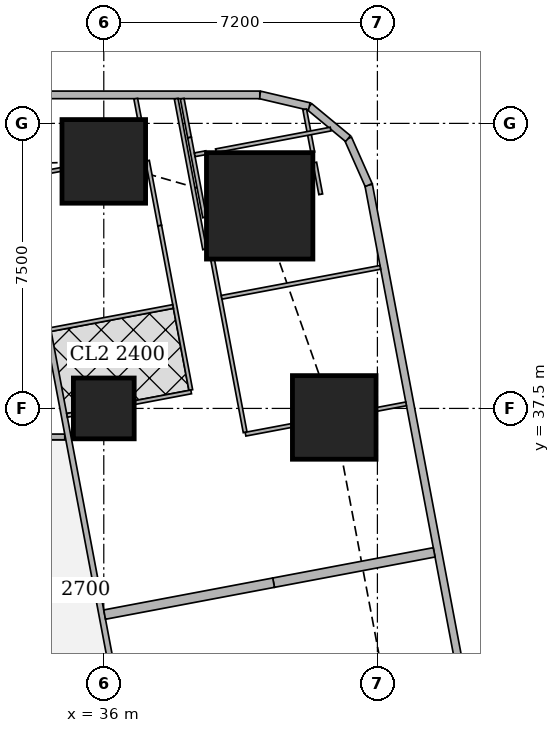
"""IFC4 building model, lengths in metres.
Left out: names, types, materials, properties, quantities, classifications, styles, units other than length and angle.
Written with IfcOpenShell. Run it as: python <this file> out.ifc"""

import sys

from ifc_helpers import new_model, si_unit, direction, frame, frame_2d, origin, origin_2d, place, context, subcontext, project, spatial, rectangle, extrude, element, fill, save


model = new_model("IFC4")
c1 = context("Model", 3, precision=1e-05, world=origin(), true_north=direction((0.0, 1.0)))
c2 = subcontext(c1, "Body", "Model", "MODEL_VIEW")
j1 = project(units=[si_unit("LENGTHUNIT", "METRE"), si_unit("PLANEANGLEUNIT", "RADIAN")], contexts=[c1])
p1 = place(None, origin())
s1 = spatial("IfcSite", under=j1, at=p1, CompositionType="ELEMENT")
p2 = place(p1, origin())
s2 = spatial("IfcBuilding", under=s1, at=p2, CompositionType="ELEMENT")
p3 = place(p2, frame((0.0, 0.0, 100.4)))
s3 = spatial("IfcBuildingStorey", under=s2, at=p3, CompositionType="ELEMENT", Elevation=100.4)
p4 = place(p3, frame((36.0, 37.5, 0.0), z_axis=(0.0, 0.0, 1.0), x_axis=(1.0, 0.0, 0.0)))
e1 = element("IfcColumn", 1, at=p4, inside=s3, PredefinedType="COLUMN", context=c2, shape_type="SweptSolid", body=[
    extrude(rectangle(XDim=1.6, YDim=1.6, at=origin_2d()), origin(), (0.0, 0.0, 1.0), 3.75),
])
p5 = place(p3, frame((42.064, 37.263, 0.0), z_axis=(0.0, 0.0, 1.0), x_axis=(1.0, 0.0, 0.0)))
e2 = element("IfcColumn", 2, at=p5, inside=s3, PredefinedType="COLUMN", context=c2, shape_type="SweptSolid", body=[
    extrude(rectangle(XDim=2.2, YDim=2.2, at=origin_2d()), origin(), (0.0, 0.0, 1.0), 3.75),
])
p6 = place(p3, frame((40.102, 42.83, 0.0), z_axis=(0.0, 0.0, 1.0), x_axis=(1.0, 0.0, 0.0)))
e3 = element("IfcColumn", 3, at=p6, inside=s3, PredefinedType="COLUMN", context=c2, shape_type="SweptSolid", body=[
    extrude(rectangle(XDim=2.8, YDim=2.8, at=origin_2d()), origin(), (0.0, 0.0, 1.0), 3.75),
])
p7 = place(p3, frame((36.0, 44.0, 0.0), z_axis=(0.0, 0.0, 1.0), x_axis=(1.0, 0.0, 0.0)))
e4 = element("IfcColumn", 4, at=p7, inside=s3, PredefinedType="COLUMN", context=c2, shape_type="SweptSolid", body=[
    extrude(rectangle(XDim=2.2, YDim=2.2, at=origin_2d()), origin(), (0.0, 0.0, 1.0), 3.75),
])
p8 = place(p3, frame((50.653, 2.703, 0.0), z_axis=(0.0, 0.0, 1.0), x_axis=(-0.185612026696, 0.982623109613, 0.0)))
e5 = element("IfcWall", 5, at=p8, inside=s3, PredefinedType="SOLIDWALL", context=c2, shape_type="SweptSolid", body=[
    extrude(rectangle(XDim=41.393, YDim=0.2, at=frame_2d((20.697, 0.0))), origin(), (0.0, 0.0, 1.0), 3.5),
])
p9 = place(p8, frame((1.633, 0.0, 0.9)))
e6 = element("IfcOpeningElement", 6, at=p9, cuts=e5, PredefinedType="OPENING", context=c2, shape_type="SweptSolid", body=[
    extrude(rectangle(XDim=1.8, YDim=1.5, at=frame_2d((0.9, 0.75))), frame((0.0, 0.11, 0.0), z_axis=(0.0, -1.0, 0.0), x_axis=(1.0, 0.0, 0.0)), (0.0, 0.0, 1.0), 0.22),
])
p10 = place(p8, frame((6.032, 0.0, 0.9)))
e7 = element("IfcOpeningElement", 7, at=p10, cuts=e5, PredefinedType="OPENING", context=c2, shape_type="SweptSolid", body=[
    extrude(rectangle(XDim=1.8, YDim=1.5, at=frame_2d((0.9, 0.75))), frame((0.0, 0.11, 0.0), z_axis=(0.0, -1.0, 0.0), x_axis=(1.0, 0.0, 0.0)), (0.0, 0.0, 1.0), 0.22),
])
p11 = place(p8, frame((9.848, 0.0, 0.9)))
e8 = element("IfcOpeningElement", 8, at=p11, cuts=e5, PredefinedType="OPENING", context=c2, shape_type="SweptSolid", body=[
    extrude(rectangle(XDim=1.8, YDim=1.5, at=frame_2d((0.9, 0.75))), frame((0.0, 0.11, 0.0), z_axis=(0.0, -1.0, 0.0), x_axis=(1.0, 0.0, 0.0)), (0.0, 0.0, 1.0), 0.22),
])
p12 = place(p8, frame((13.664, 0.0, 0.9)))
e9 = element("IfcOpeningElement", 9, at=p12, cuts=e5, PredefinedType="OPENING", context=c2, shape_type="SweptSolid", body=[
    extrude(rectangle(XDim=1.8, YDim=1.5, at=frame_2d((0.9, 0.75))), frame((0.0, 0.11, 0.0), z_axis=(0.0, -1.0, 0.0), x_axis=(1.0, 0.0, 0.0)), (0.0, 0.0, 1.0), 0.22),
])
p13 = place(p8, frame((17.481, 0.0, 0.9)))
e10 = element("IfcOpeningElement", 10, at=p13, cuts=e5, PredefinedType="OPENING", context=c2, shape_type="SweptSolid", body=[
    extrude(rectangle(XDim=1.8, YDim=1.5, at=frame_2d((0.9, 0.75))), frame((0.0, 0.11, 0.0), z_axis=(0.0, -1.0, 0.0), x_axis=(1.0, 0.0, 0.0)), (0.0, 0.0, 1.0), 0.22),
])
p14 = place(p8, frame((21.297, 0.0, 0.9)))
e11 = element("IfcOpeningElement", 11, at=p14, cuts=e5, PredefinedType="OPENING", context=c2, shape_type="SweptSolid", body=[
    extrude(rectangle(XDim=1.8, YDim=1.5, at=frame_2d((0.9, 0.75))), frame((0.0, 0.11, 0.0), z_axis=(0.0, -1.0, 0.0), x_axis=(1.0, 0.0, 0.0)), (0.0, 0.0, 1.0), 0.22),
])
p15 = place(p8, frame((25.113, 0.0, 0.9)))
e12 = element("IfcOpeningElement", 12, at=p15, cuts=e5, PredefinedType="OPENING", context=c2, shape_type="SweptSolid", body=[
    extrude(rectangle(XDim=1.8, YDim=1.5, at=frame_2d((0.9, 0.75))), frame((0.0, 0.11, 0.0), z_axis=(0.0, -1.0, 0.0), x_axis=(1.0, 0.0, 0.0)), (0.0, 0.0, 1.0), 0.22),
])
p16 = place(p8, frame((28.93, 0.0, 0.9)))
e13 = element("IfcOpeningElement", 13, at=p16, cuts=e5, PredefinedType="OPENING", context=c2, shape_type="SweptSolid", body=[
    extrude(rectangle(XDim=1.8, YDim=1.5, at=frame_2d((0.9, 0.75))), frame((0.0, 0.11, 0.0), z_axis=(0.0, -1.0, 0.0), x_axis=(1.0, 0.0, 0.0)), (0.0, 0.0, 1.0), 0.22),
])
p17 = place(p8, frame((32.746, 0.0, 0.9)))
e14 = element("IfcOpeningElement", 14, at=p17, cuts=e5, PredefinedType="OPENING", context=c2, shape_type="SweptSolid", body=[
    extrude(rectangle(XDim=1.8, YDim=1.5, at=frame_2d((0.9, 0.75))), frame((0.0, 0.11, 0.0), z_axis=(0.0, -1.0, 0.0), x_axis=(1.0, 0.0, 0.0)), (0.0, 0.0, 1.0), 0.22),
])
p18 = place(p8, frame((36.481, 0.0, 0.9)))
e15 = element("IfcOpeningElement", 15, at=p18, cuts=e5, PredefinedType="OPENING", context=c2, shape_type="SweptSolid", body=[
    extrude(rectangle(XDim=1.8, YDim=1.5, at=frame_2d((0.9, 0.75))), frame((0.0, 0.11, 0.0), z_axis=(0.0, -1.0, 0.0), x_axis=(1.0, 0.0, 0.0)), (0.0, 0.0, 1.0), 0.22),
])
p19 = place(p3, frame((42.97, 43.377, 0.0), z_axis=(0.0, 0.0, 1.0), x_axis=(-0.406002956633, 0.913871762998, 0.0)))
e16 = element("IfcWall", 16, at=p19, inside=s3, PredefinedType="SOLIDWALL", context=c2, shape_type="SweptSolid", body=[
    extrude(rectangle(XDim=1.337, YDim=0.2, at=frame_2d((0.669, 0.0))), origin(), (0.0, 0.0, 1.0), 3.5),
])
p20 = place(p3, frame((42.427, 44.599, 0.0), z_axis=(0.0, 0.0, 1.0), x_axis=(-0.770091412544, 0.637933551655, 0.0)))
e17 = element("IfcWall", 17, at=p20, inside=s3, PredefinedType="SOLIDWALL", context=c2, shape_type="SweptSolid", body=[
    extrude(rectangle(XDim=1.324, YDim=0.2, at=frame_2d((0.662, 0.0))), origin(), (0.0, 0.0, 1.0), 3.5),
])
p21 = place(p3, frame((41.407, 45.444, 0.0), z_axis=(0.0, 0.0, 1.0), x_axis=(-0.973453091607, 0.228886606077, 0.0)))
e18 = element("IfcWall", 18, at=p21, inside=s3, PredefinedType="SOLIDWALL", context=c2, shape_type="SweptSolid", body=[
    extrude(rectangle(XDim=1.336, YDim=0.2, at=frame_2d((0.668, 0.0))), origin(), (0.0, 0.0, 1.0), 3.5),
])
p22 = place(p3, frame((40.106, 45.75, 0.0), z_axis=(0.0, 0.0, 1.0), x_axis=(-1.0, 0.0, 0.0)))
e19 = element("IfcWall", 19, at=p22, inside=s3, PredefinedType="SOLIDWALL", context=c2, shape_type="SweptSolid", body=[
    extrude(rectangle(XDim=37.943, YDim=0.2, at=frame_2d((18.971, 0.0))), origin(), (0.0, 0.0, 1.0), 3.5),
])
p23 = place(p22, frame((8.606, 0.0, 0.9)))
e20 = element("IfcOpeningElement", 20, at=p23, cuts=e19, PredefinedType="OPENING", context=c2, shape_type="SweptSolid", body=[
    extrude(rectangle(XDim=1.8, YDim=1.5, at=frame_2d((0.9, 0.75))), frame((0.0, 0.11, 0.0), z_axis=(0.0, -1.0, 0.0), x_axis=(1.0, 0.0, 0.0)), (0.0, 0.0, 1.0), 0.22),
])
p24 = place(p22, frame((12.206, 0.0, 0.9)))
e21 = element("IfcOpeningElement", 21, at=p24, cuts=e19, PredefinedType="OPENING", context=c2, shape_type="SweptSolid", body=[
    extrude(rectangle(XDim=1.8, YDim=1.5, at=frame_2d((0.9, 0.75))), frame((0.0, 0.11, 0.0), z_axis=(0.0, -1.0, 0.0), x_axis=(1.0, 0.0, 0.0)), (0.0, 0.0, 1.0), 0.22),
])
p25 = place(p22, frame((15.806, 0.0, 0.9)))
e22 = element("IfcOpeningElement", 22, at=p25, cuts=e19, PredefinedType="OPENING", context=c2, shape_type="SweptSolid", body=[
    extrude(rectangle(XDim=1.8, YDim=1.5, at=frame_2d((0.9, 0.75))), frame((0.0, 0.11, 0.0), z_axis=(0.0, -1.0, 0.0), x_axis=(1.0, 0.0, 0.0)), (0.0, 0.0, 1.0), 0.22),
])
p26 = place(p22, frame((19.406, 0.0, 0.9)))
e23 = element("IfcOpeningElement", 23, at=p26, cuts=e19, PredefinedType="OPENING", context=c2, shape_type="SweptSolid", body=[
    extrude(rectangle(XDim=1.8, YDim=1.5, at=frame_2d((0.9, 0.75))), frame((0.0, 0.11, 0.0), z_axis=(0.0, -1.0, 0.0), x_axis=(1.0, 0.0, 0.0)), (0.0, 0.0, 1.0), 0.22),
])
p27 = place(p22, frame((23.006, 0.0, 0.9)))
e24 = element("IfcOpeningElement", 24, at=p27, cuts=e19, PredefinedType="OPENING", context=c2, shape_type="SweptSolid", body=[
    extrude(rectangle(XDim=1.8, YDim=1.5, at=frame_2d((0.9, 0.75))), frame((0.0, 0.11, 0.0), z_axis=(0.0, -1.0, 0.0), x_axis=(1.0, 0.0, 0.0)), (0.0, 0.0, 1.0), 0.22),
])
p28 = place(p22, frame((26.606, 0.0, 0.9)))
e25 = element("IfcOpeningElement", 25, at=p28, cuts=e19, PredefinedType="OPENING", context=c2, shape_type="SweptSolid", body=[
    extrude(rectangle(XDim=1.8, YDim=1.5, at=frame_2d((0.9, 0.75))), frame((0.0, 0.11, 0.0), z_axis=(0.0, -1.0, 0.0), x_axis=(1.0, 0.0, 0.0)), (0.0, 0.0, 1.0), 0.22),
])
p29 = place(p3, frame((29.601, 36.75, 0.0), z_axis=(0.0, 0.0, 1.0), x_axis=(1.0, 0.0, 0.0)))
e26 = element("IfcWall", 26, at=p29, inside=s3, PredefinedType="SOLIDWALL", context=c2, shape_type="SweptSolid", body=[
    extrude(rectangle(XDim=5.372, YDim=0.15, at=frame_2d((2.686, 0.0))), origin(), (0.0, 0.0, 1.0), 3.5),
])
p30 = place(p3, frame((33.382, 45.65, 0.0), z_axis=(0.0, 0.0, 1.0), x_axis=(0.185593544777, -0.982626600565, 0.0)))
e27 = element("IfcWall", 27, at=p30, inside=s3, PredefinedType="SOLIDWALL", context=c2, shape_type="SweptSolid", body=[
    extrude(rectangle(XDim=47.118, YDim=0.15, at=frame_2d((23.559, 0.0))), origin(), (0.0, 0.0, 1.0), 2.2),
])
p31 = place(p30, frame((10.662, 0.0, 0.0)))
e28 = element("IfcOpeningElement", 28, at=p31, cuts=e27, PredefinedType="OPENING", context=c2, shape_type="SweptSolid", body=[
    extrude(rectangle(XDim=1.0, YDim=2.1, at=frame_2d((0.5, 1.05))), frame((0.0, 0.085, 0.0), z_axis=(0.0, -1.0, 0.0), x_axis=(1.0, 0.0, 0.0)), (0.0, 0.0, 1.0), 0.17),
])
p32 = place(p30, frame((15.237, 0.0, 0.0)))
e29 = element("IfcOpeningElement", 29, at=p32, cuts=e27, PredefinedType="OPENING", context=c2, shape_type="SweptSolid", body=[
    extrude(rectangle(XDim=1.0, YDim=2.1, at=frame_2d((0.5, 1.05))), frame((0.0, 0.085, 0.0), z_axis=(0.0, -1.0, 0.0), x_axis=(1.0, 0.0, 0.0)), (0.0, 0.0, 1.0), 0.17),
])
p33 = place(p30, frame((27.341, 0.0, 0.0)))
e30 = element("IfcOpeningElement", 30, at=p33, cuts=e27, PredefinedType="OPENING", context=c2, shape_type="SweptSolid", body=[
    extrude(rectangle(XDim=1.0, YDim=2.1, at=frame_2d((0.5, 1.05))), frame((0.0, 0.085, 0.0), z_axis=(0.0, -1.0, 0.0), x_axis=(1.0, 0.0, 0.0)), (0.0, 0.0, 1.0), 0.17),
])
p34 = place(p30, frame((33.833, 0.0, 0.0)))
e31 = element("IfcOpeningElement", 31, at=p34, cuts=e27, PredefinedType="OPENING", context=c2, shape_type="SweptSolid", body=[
    extrude(rectangle(XDim=1.0, YDim=2.1, at=frame_2d((0.5, 1.05))), frame((0.0, 0.085, 0.0), z_axis=(0.0, -1.0, 0.0), x_axis=(1.0, 0.0, 0.0)), (0.0, 0.0, 1.0), 0.17),
])
p35 = place(p3, frame((38.654, 41.686, 0.0), z_axis=(0.0, 0.0, 1.0), x_axis=(-0.185676896978, 0.982610853761, 0.0)))
e32 = element("IfcWall", 32, at=p35, inside=s3, PredefinedType="PARTITIONING", context=c2, shape_type="SweptSolid", body=[
    extrude(rectangle(XDim=4.034, YDim=0.1, at=frame_2d((2.017, 0.0))), origin(), (0.0, 0.0, 1.0), 2.05),
])
p36 = place(p3, frame((41.287, 45.37, 0.0), z_axis=(0.0, 0.0, 1.0), x_axis=(0.185121628323, -0.982715616405, 0.0)))
e33 = element("IfcWall", 33, at=p36, inside=s3, PredefinedType="PARTITIONING", context=c2, shape_type="SweptSolid", body=[
    extrude(rectangle(XDim=1.15, YDim=0.1, at=frame_2d((0.575, 0.0))), origin(), (0.0, 0.0, 1.0), 3.5),
])
p37 = place(p3, frame((41.551, 43.969, 0.0), z_axis=(0.0, 0.0, 1.0), x_axis=(0.185884171512, -0.982571663942, 0.0)))
e34 = element("IfcWall", 34, at=p37, inside=s3, PredefinedType="PARTITIONING", context=c2, shape_type="SweptSolid", body=[
    extrude(rectangle(XDim=0.85, YDim=0.1, at=frame_2d((0.425, 0.0))), origin(), (0.0, 0.0, 1.0), 3.5),
])
p38 = place(p3, frame((38.063, 45.65, 0.0), z_axis=(0.0, 0.0, 1.0), x_axis=(0.185677287841, -0.982610779902, 0.0)))
e35 = element("IfcWall", 35, at=p38, inside=s3, PredefinedType="PARTITIONING", context=c2, shape_type="SweptSolid", body=[
    extrude(rectangle(XDim=1.04, YDim=0.1, at=frame_2d((0.52, 0.0))), origin(), (0.0, 0.0, 1.0), 3.5),
])
p39 = place(p3, frame((38.256, 44.628, 0.0), z_axis=(0.0, 0.0, 1.0), x_axis=(0.185674153532, -0.982611372166, 0.0)))
e36 = element("IfcWall", 36, at=p39, inside=s3, PredefinedType="PARTITIONING", context=c2, shape_type="SweptSolid", body=[
    extrude(rectangle(XDim=2.138, YDim=0.1, at=frame_2d((1.069, 0.0))), origin(), (0.0, 0.0, 1.0), 2.05),
])
p40 = place(p3, frame((38.862, 41.42, 0.0), z_axis=(0.0, 0.0, 1.0), x_axis=(0.185332907641, -0.982675792592, 0.0)))
e37 = element("IfcWall", 37, at=p40, inside=s3, PredefinedType="PARTITIONING", context=c2, shape_type="SweptSolid", body=[
    extrude(rectangle(XDim=4.629, YDim=0.1, at=frame_2d((2.314, 0.0))), origin(), (0.0, 0.0, 1.0), 3.5),
])
p41 = place(p40, frame((2.22, 0.0, 0.0)))
e38 = element("IfcOpeningElement", 38, at=p41, cuts=e37, PredefinedType="OPENING", context=c2, shape_type="SweptSolid", body=[
    extrude(rectangle(XDim=0.9, YDim=2.1, at=frame_2d((0.45, 1.05))), frame((0.0, 0.06, 0.0), z_axis=(0.0, -1.0, 0.0), x_axis=(1.0, 0.0, 0.0)), (0.0, 0.0, 1.0), 0.12),
])
p42 = place(p3, frame((36.841, 45.65, 0.0), z_axis=(0.0, 0.0, 1.0), x_axis=(0.185764109712, -0.98259436979, 0.0)))
e39 = element("IfcWall", 39, at=p42, inside=s3, PredefinedType="PARTITIONING", context=c2, shape_type="SweptSolid", body=[
    extrude(rectangle(XDim=0.549, YDim=0.1, at=frame_2d((0.275, 0.0))), origin(), (0.0, 0.0, 1.0), 3.5),
])
p43 = place(p3, frame((37.149, 44.018, 0.0), z_axis=(0.0, 0.0, 1.0), x_axis=(0.185712190756, -0.982604183893, 0.0)))
e40 = element("IfcWall", 40, at=p43, inside=s3, PredefinedType="PARTITIONING", context=c2, shape_type="SweptSolid", body=[
    extrude(rectangle(XDim=1.739, YDim=0.1, at=frame_2d((0.87, 0.0))), origin(), (0.0, 0.0, 1.0), 2.05),
])
p44 = place(p3, frame((37.472, 42.309, 0.0), z_axis=(0.0, 0.0, 1.0), x_axis=(0.185641287362, -0.982617581985, 0.0)))
e41 = element("IfcWall", 41, at=p44, inside=s3, PredefinedType="PARTITIONING", context=c2, shape_type="SweptSolid", body=[
    extrude(rectangle(XDim=4.402, YDim=0.1, at=frame_2d((2.201, 0.0))), origin(), (0.0, 0.0, 1.0), 3.5),
])
p45 = place(p44, frame((2.854, 0.0, 0.0)))
e42 = element("IfcOpeningElement", 42, at=p45, cuts=e41, PredefinedType="OPENING", context=c2, shape_type="SweptSolid", body=[
    extrude(rectangle(XDim=0.9, YDim=2.1, at=frame_2d((0.45, 1.05))), frame((0.0, 0.06, 0.0), z_axis=(0.0, -1.0, 0.0), x_axis=(1.0, 0.0, 0.0)), (0.0, 0.0, 1.0), 0.12),
])
p46 = place(p3, frame((41.968, 44.85, 0.0), z_axis=(0.0, 0.0, 1.0), x_axis=(-0.982566714195, -0.185910333644, 0.0)))
e43 = element("IfcWall", 43, at=p46, inside=s3, PredefinedType="PARTITIONING", context=c2, shape_type="SweptSolid", body=[
    extrude(rectangle(XDim=3.072, YDim=0.1, at=frame_2d((1.536, 0.0))), origin(), (0.0, 0.0, 1.0), 2.05),
])
p47 = place(p3, frame((38.692, 44.23, 0.0), z_axis=(0.0, 0.0, 1.0), x_axis=(-0.982944840311, -0.183900627803, 0.0)))
e44 = element("IfcWall", 44, at=p47, inside=s3, PredefinedType="PARTITIONING", context=c2, shape_type="SweptSolid", body=[
    extrude(rectangle(XDim=0.304, YDim=0.1, at=frame_2d((0.152, 0.0))), origin(), (0.0, 0.0, 1.0), 2.05),
])
p48 = place(p3, frame((43.277, 41.212, 0.0), z_axis=(0.0, 0.0, 1.0), x_axis=(-0.982665405803, -0.185387972203, 0.0)))
e45 = element("IfcWall", 45, at=p48, inside=s3, PredefinedType="PARTITIONING", context=c2, shape_type="SweptSolid", body=[
    extrude(rectangle(XDim=4.25, YDim=0.1, at=frame_2d((2.125, 0.0))), origin(), (0.0, 0.0, 1.0), 2.05),
])
p49 = place(p3, frame((43.955, 37.62, 0.0), z_axis=(0.0, 0.0, 1.0), x_axis=(-0.98247004097, -0.186420542316, 0.0)))
e46 = element("IfcWall", 46, at=p49, inside=s3, PredefinedType="PARTITIONING", context=c2, shape_type="SweptSolid", body=[
    extrude(rectangle(XDim=0.795, YDim=0.1, at=frame_2d((0.397, 0.0))), origin(), (0.0, 0.0, 1.0), 2.05),
])
p50 = place(p3, frame((40.954, 37.053, 0.0), z_axis=(0.0, 0.0, 1.0), x_axis=(-0.982663001154, -0.185400717808, 0.0)))
e47 = element("IfcWall", 47, at=p50, inside=s3, PredefinedType="PARTITIONING", context=c2, shape_type="SweptSolid", body=[
    extrude(rectangle(XDim=1.246, YDim=0.1, at=frame_2d((0.623, 0.0))), origin(), (0.0, 0.0, 1.0), 2.05),
])
p51 = place(p3, frame((34.89, 43.791, 0.0), z_axis=(0.0, 0.0, 1.0), x_axis=(-0.982621304855, -0.185621580763, 0.0)))
e48 = element("IfcWall", 48, at=p51, inside=s3, PredefinedType="PARTITIONING", context=c2, shape_type="SweptSolid", body=[
    extrude(rectangle(XDim=1.062, YDim=0.1, at=frame_2d((0.531, 0.0))), origin(), (0.0, 0.0, 1.0), 2.05),
])
p52 = place(p3, frame((37.823, 40.182, 0.0), z_axis=(0.0, 0.0, 1.0), x_axis=(-0.982664729897, -0.18539155487, 0.0)))
e49 = element("IfcWall", 49, at=p52, inside=s3, PredefinedType="PARTITIONING", context=c2, shape_type="SweptSolid", body=[
    extrude(rectangle(XDim=3.274, YDim=0.1, at=frame_2d((1.637, 0.0))), origin(), (0.0, 0.0, 1.0), 3.5),
])
p53 = place(p3, frame((38.299, 37.935, 0.0), z_axis=(0.0, 0.0, 1.0), x_axis=(-0.982536828695, -0.186068213993, 0.0)))
e50 = element("IfcWall", 50, at=p53, inside=s3, PredefinedType="PARTITIONING", context=c2, shape_type="SweptSolid", body=[
    extrude(rectangle(XDim=1.515, YDim=0.1, at=frame_2d((0.758, 0.0))), origin(), (0.0, 0.0, 1.0), 3.5),
])
p54 = place(p3, frame((35.19, 37.347, 0.0), z_axis=(0.0, 0.0, 1.0), x_axis=(-0.982404955251, -0.186763229514, 0.0)))
e51 = element("IfcWall", 51, at=p54, inside=s3, PredefinedType="PARTITIONING", context=c2, shape_type="SweptSolid", body=[
    extrude(rectangle(XDim=0.161, YDim=0.1, at=frame_2d((0.081, 0.0))), origin(), (0.0, 0.0, 1.0), 3.5),
])
p55 = place(p3, frame((44.693, 33.713, 0.0), z_axis=(0.0, 0.0, 1.0), x_axis=(-0.982633535512, -0.185556823879, 0.0)))
e52 = element("IfcWall", 52, at=p55, inside=s3, PredefinedType="SOLIDWALL", context=c2, shape_type="SweptSolid", body=[
    extrude(rectangle(XDim=4.3, YDim=0.25, at=frame_2d((2.15, 0.0))), origin(), (0.0, 0.0, 1.0), 2.2),
])
p56 = place(p3, frame((40.468, 32.915, 0.0), z_axis=(0.0, 0.0, 1.0), x_axis=(-0.982612837616, -0.185666398014, 0.0)))
e53 = element("IfcWall", 53, at=p56, inside=s3, PredefinedType="SOLIDWALL", context=c2, shape_type="SweptSolid", body=[
    extrude(rectangle(XDim=4.525, YDim=0.25, at=frame_2d((2.262, 0.0))), origin(), (0.0, 0.0, 1.0), 3.5),
])
p57 = place(p3, frame((38.202, 10.163, 0.0), z_axis=(0.0, 0.0, 1.0), x_axis=(-0.185610321132, 0.982623431783, 0.0)))
e54 = element("IfcWall", 54, at=p57, inside=s3, PredefinedType="PARTITIONING", context=c2, shape_type="SweptSolid", body=[
    extrude(rectangle(XDim=25.111, YDim=0.125, at=frame_2d((12.556, 0.0))), origin(), (0.0, 0.0, 1.0), 2.5),
])
p58 = place(p57, frame((0.708, 0.0, 0.0)))
e55 = element("IfcOpeningElement", 55, at=p58, cuts=e54, PredefinedType="OPENING", context=c2, shape_type="SweptSolid", body=[
    extrude(rectangle(XDim=1.0, YDim=2.1, at=frame_2d((0.5, 1.05))), frame((0.0, 0.073, 0.0), z_axis=(0.0, -1.0, 0.0), x_axis=(1.0, 0.0, 0.0)), (0.0, 0.0, 1.0), 0.145),
])
p59 = place(p57, frame((6.0, 0.0, 0.0)))
e56 = element("IfcOpeningElement", 56, at=p59, cuts=e54, PredefinedType="OPENING", context=c2, shape_type="SweptSolid", body=[
    extrude(rectangle(XDim=1.0, YDim=2.1, at=frame_2d((0.5, 1.05))), frame((0.0, 0.073, 0.0), z_axis=(0.0, -1.0, 0.0), x_axis=(1.0, 0.0, 0.0)), (0.0, 0.0, 1.0), 0.145),
])
p60 = place(p57, frame((13.378, 0.0, 0.0)))
e57 = element("IfcOpeningElement", 57, at=p60, cuts=e54, PredefinedType="OPENING", context=c2, shape_type="SweptSolid", body=[
    extrude(rectangle(XDim=1.0, YDim=2.1, at=frame_2d((0.5, 1.05))), frame((0.0, 0.073, 0.0), z_axis=(0.0, -1.0, 0.0), x_axis=(1.0, 0.0, 0.0)), (0.0, 0.0, 1.0), 0.145),
])
p61 = place(p57, frame((21.25, 0.0, 0.0)))
e58 = element("IfcOpeningElement", 58, at=p61, cuts=e54, PredefinedType="OPENING", context=c2, shape_type="SweptSolid", body=[
    extrude(rectangle(XDim=1.0, YDim=2.1, at=frame_2d((0.5, 1.05))), frame((0.0, 0.073, 0.0), z_axis=(0.0, -1.0, 0.0), x_axis=(1.0, 0.0, 0.0)), (0.0, 0.0, 1.0), 0.145),
])
p62 = place(p16, origin())
e59 = element("IfcWindow", 59, at=p62, inside=s3, PartitioningType="SINGLE_PANEL", PredefinedType="WINDOW", context=c2, shape_type="SweptSolid", body=[
    extrude(rectangle(XDim=1.8, YDim=1.5, at=frame_2d((0.9, 0.75))), frame((0.0, 0.03, 0.0), z_axis=(0.0, -1.0, 0.0), x_axis=(1.0, 0.0, 0.0)), (0.0, 0.0, 1.0), 0.06),
])
fill(e13, e59)
p63 = place(p17, origin())
e60 = element("IfcWindow", 60, at=p63, inside=s3, PartitioningType="SINGLE_PANEL", PredefinedType="WINDOW", context=c2, shape_type="SweptSolid", body=[
    extrude(rectangle(XDim=1.8, YDim=1.5, at=frame_2d((0.9, 0.75))), frame((0.0, 0.03, 0.0), z_axis=(0.0, -1.0, 0.0), x_axis=(1.0, 0.0, 0.0)), (0.0, 0.0, 1.0), 0.06),
])
fill(e14, e60)
p64 = place(p18, origin())
e61 = element("IfcWindow", 61, at=p64, inside=s3, PartitioningType="SINGLE_PANEL", PredefinedType="WINDOW", context=c2, shape_type="SweptSolid", body=[
    extrude(rectangle(XDim=1.8, YDim=1.5, at=frame_2d((0.9, 0.75))), frame((0.0, 0.03, 0.0), z_axis=(0.0, -1.0, 0.0), x_axis=(1.0, 0.0, 0.0)), (0.0, 0.0, 1.0), 0.06),
])
fill(e15, e61)
p65 = place(p41, origin())
e62 = element("IfcDoor", 62, at=p65, inside=s3, OperationType="SINGLE_SWING_LEFT", PredefinedType="DOOR", context=c2, shape_type="SweptSolid", body=[
    extrude(rectangle(XDim=0.9, YDim=2.1, at=frame_2d((0.45, 1.05))), frame((0.0, 0.025, 0.0), z_axis=(0.0, -1.0, 0.0), x_axis=(1.0, 0.0, 0.0)), (0.0, 0.0, 1.0), 0.05),
])
fill(e38, e62)
p66 = place(p45, origin())
e63 = element("IfcDoor", 63, at=p66, inside=s3, OperationType="SINGLE_SWING_LEFT", PredefinedType="DOOR", context=c2, shape_type="SweptSolid", body=[
    extrude(rectangle(XDim=0.9, YDim=2.1, at=frame_2d((0.45, 1.05))), frame((0.0, 0.025, 0.0), z_axis=(0.0, -1.0, 0.0), x_axis=(1.0, 0.0, 0.0)), (0.0, 0.0, 1.0), 0.05),
])
fill(e42, e63)
p67 = place(p31, origin())
e64 = element("IfcDoor", 64, at=p67, inside=s3, OperationType="SINGLE_SWING_RIGHT", PredefinedType="DOOR", context=c2, shape_type="SweptSolid", body=[
    extrude(rectangle(XDim=1.0, YDim=2.1, at=frame_2d((0.5, 1.05))), frame((0.0, 0.025, 0.0), z_axis=(0.0, -1.0, 0.0), x_axis=(1.0, 0.0, 0.0)), (0.0, 0.0, 1.0), 0.05),
])
fill(e28, e64)
save(model, sys.argv[1])
